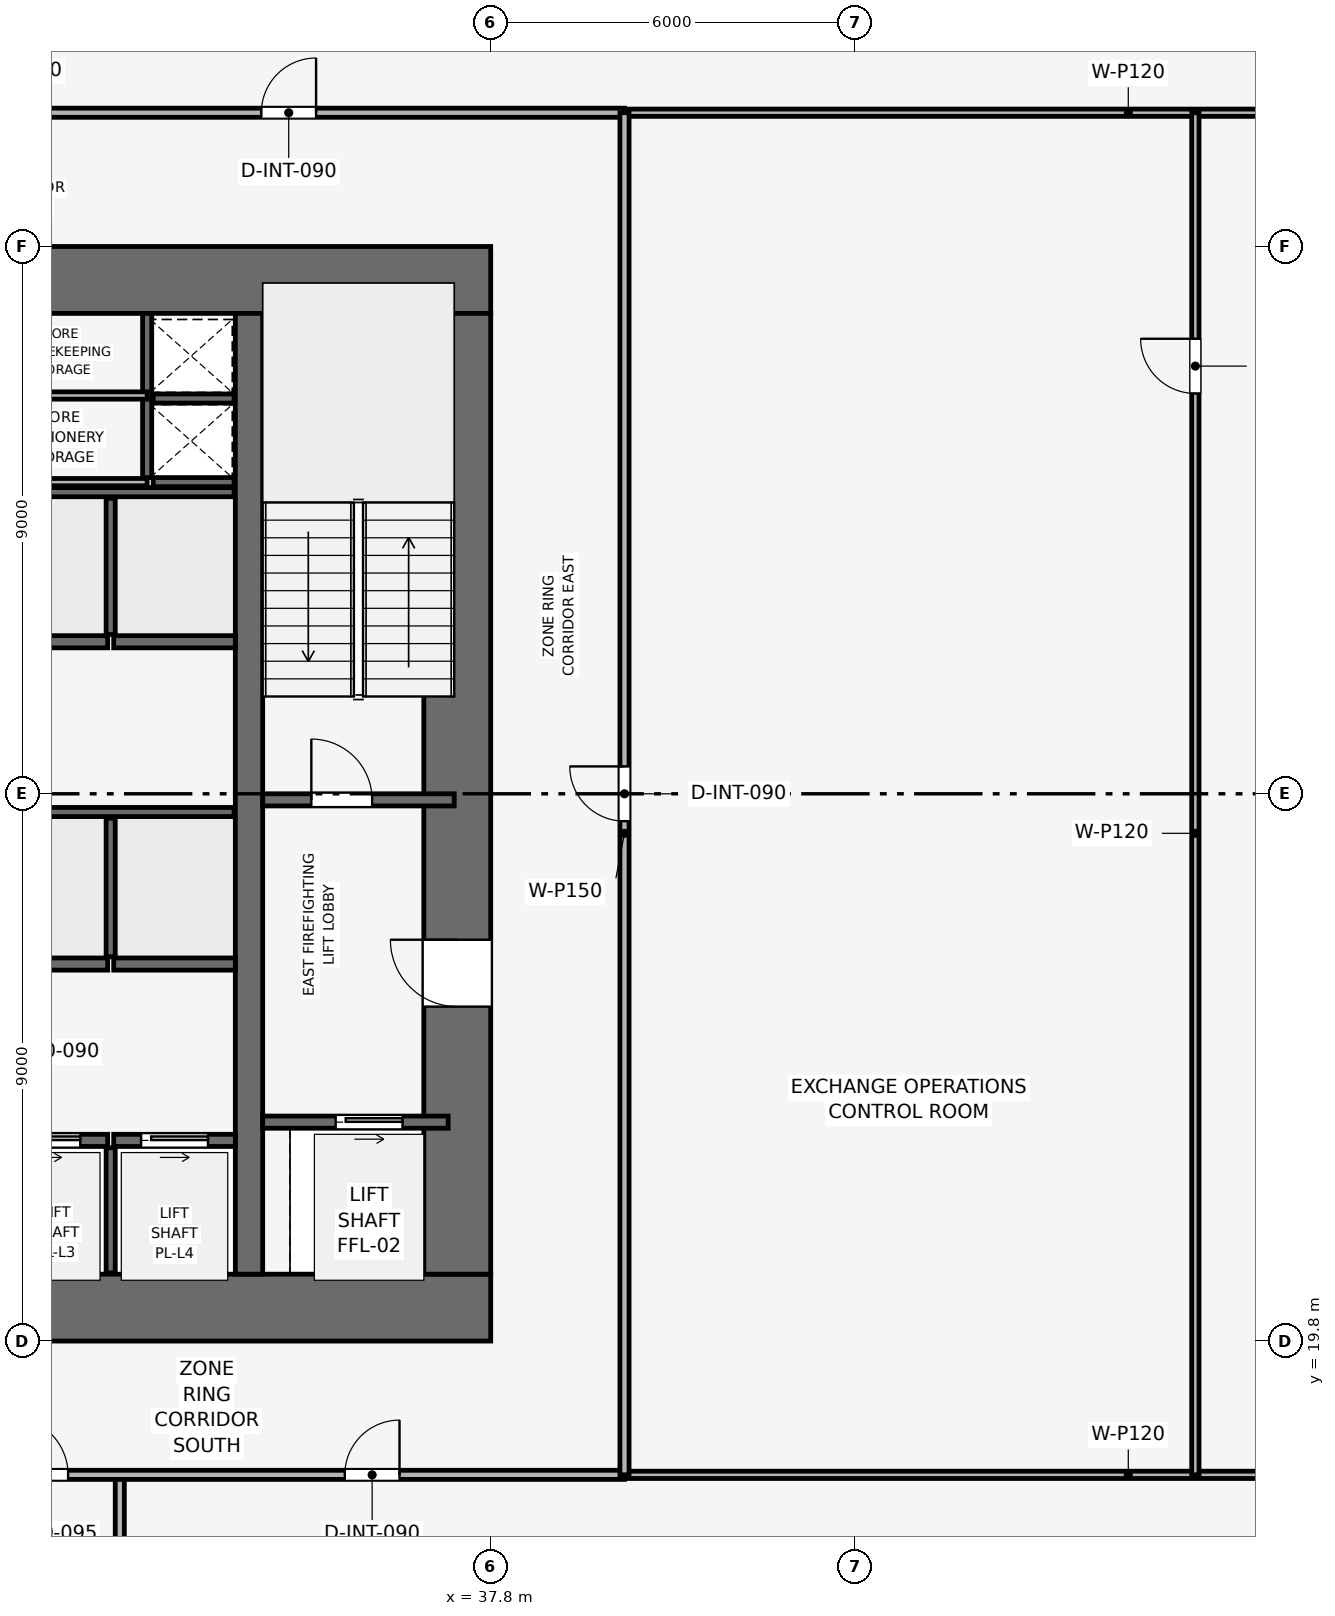
"""IFC4 building model, lengths in metres.
Left out: names, types, materials, properties, quantities, classifications, styles, units other than length and angle.
Written with IfcOpenShell. Run it as: python <this file> out.ifc"""

import sys

from ifc_helpers import new_model, si_unit, direction, frame, frame_2d, origin, place, context, subcontext, project, spatial, rectangle, extrude, element, fill, save


model = new_model("IFC4")
c1 = context("Model", 3, precision=1e-05, world=origin(), true_north=direction((0.0, 1.0)))
c2 = subcontext(c1, "Body", "Model", "MODEL_VIEW")
j1 = project(units=[si_unit("LENGTHUNIT", "METRE"), si_unit("PLANEANGLEUNIT", "RADIAN")], contexts=[c1])
p1 = place(None, origin())
s1 = spatial("IfcSite", under=j1, at=p1, CompositionType="ELEMENT")
p2 = place(p1, origin())
s2 = spatial("IfcBuilding", under=s1, at=p2, CompositionType="ELEMENT")
p3 = place(p2, frame((0.0, 0.0, 80.7)))
s3 = spatial("IfcBuildingStorey", under=s2, at=p3, CompositionType="ELEMENT", Elevation=80.7)
p4 = place(p3, frame((19.8, 20.35, 0.0), z_axis=(0.0, 0.0, 1.0), x_axis=(1.0, 0.0, 0.0)))
e1 = element("IfcWall", 1, at=p4, inside=s3, PredefinedType="SHEAR", context=c2, shape_type="SweptSolid", body=[
    extrude(rectangle(XDim=18.0, YDim=1.1, at=frame_2d((9.0, 0.0))), origin(), (0.0, 0.0, 1.0), 3.9),
])
p5 = place(p4, frame((8.4, 0.0, 0.0)))
e2 = element("IfcOpeningElement", 2, at=p5, cuts=e1, PredefinedType="OPENING", context=c2, shape_type="SweptSolid", body=[
    extrude(rectangle(XDim=1.2, YDim=2.2, at=frame_2d((0.6, 1.1))), frame((0.0, 0.56, 0.0), z_axis=(0.0, -1.0, 0.0), x_axis=(1.0, 0.0, 0.0)), (0.0, 0.0, 1.0), 1.12),
])
p6 = place(p3, frame((19.8, 37.25, 0.0), z_axis=(0.0, 0.0, 1.0), x_axis=(1.0, 0.0, 0.0)))
e3 = element("IfcWall", 3, at=p6, inside=s3, PredefinedType="SHEAR", context=c2, shape_type="SweptSolid", body=[
    extrude(rectangle(XDim=18.0, YDim=1.1, at=frame_2d((9.0, 0.0))), origin(), (0.0, 0.0, 1.0), 3.9),
])
p7 = place(p6, frame((7.05, 0.0, 0.0)))
e4 = element("IfcOpeningElement", 4, at=p7, cuts=e3, PredefinedType="OPENING", context=c2, shape_type="SweptSolid", body=[
    extrude(rectangle(XDim=1.1, YDim=2.15, at=frame_2d((0.55, 1.075))), frame((0.0, 0.56, 0.0), z_axis=(0.0, -1.0, 0.0), x_axis=(1.0, 0.0, 0.0)), (0.0, 0.0, 1.0), 1.12),
])
p8 = place(p3, frame((37.25, 20.9, 0.0), z_axis=(0.0, 0.0, 1.0), x_axis=(0.0, 1.0, 0.0)))
e5 = element("IfcWall", 5, at=p8, inside=s3, PredefinedType="SHEAR", context=c2, shape_type="SweptSolid", body=[
    extrude(rectangle(XDim=15.8, YDim=1.1, at=frame_2d((7.9, 0.0))), origin(), (0.0, 0.0, 1.0), 3.9),
])
p9 = place(p8, frame((4.4, 0.0, 0.0)))
e6 = element("IfcOpeningElement", 6, at=p9, cuts=e5, PredefinedType="OPENING", context=c2, shape_type="SweptSolid", body=[
    extrude(rectangle(XDim=1.1, YDim=2.15, at=frame_2d((0.55, 1.075))), frame((0.0, 0.56, 0.0), z_axis=(0.0, -1.0, 0.0), x_axis=(1.0, 0.0, 0.0)), (0.0, 0.0, 1.0), 1.12),
])
p10 = place(p3, frame((33.825, 20.9, 0.0), z_axis=(0.0, 0.0, 1.0), x_axis=(0.0, 1.0, 0.0)))
e7 = element("IfcWall", 7, at=p10, inside=s3, PredefinedType="SHEAR", context=c2, shape_type="SweptSolid", body=[
    extrude(rectangle(XDim=15.8, YDim=0.45, at=frame_2d((7.9, 0.0))), origin(), (0.0, 0.0, 1.0), 3.9),
])
p11 = place(p3, frame((34.05, 28.7, 0.0), z_axis=(0.0, 0.0, 1.0), x_axis=(1.0, 0.0, 0.0)))
e8 = element("IfcWall", 8, at=p11, inside=s3, PredefinedType="SHEAR", context=c2, shape_type="SweptSolid", body=[
    extrude(rectangle(XDim=3.15, YDim=0.2, at=frame_2d((1.575, 0.0))), origin(), (0.0, 0.0, 1.0), 3.65),
])
p12 = place(p11, frame((0.8, 0.0, 0.0)))
e9 = element("IfcOpeningElement", 9, at=p12, cuts=e8, PredefinedType="OPENING", context=c2, shape_type="SweptSolid", body=[
    extrude(rectangle(XDim=1.0, YDim=2.1, at=frame_2d((0.5, 1.05))), frame((0.0, 0.11, 0.0), z_axis=(0.0, -1.0, 0.0), x_axis=(1.0, 0.0, 0.0)), (0.0, 0.0, 1.0), 0.22),
])
p13 = place(p3, frame((32.15, 34.0, 0.0), z_axis=(0.0, 0.0, 1.0), x_axis=(0.0, 1.0, 0.0)))
e10 = element("IfcWall", 10, at=p13, inside=s3, PredefinedType="SHEAR", context=c2, shape_type="SweptSolid", body=[
    extrude(rectangle(XDim=2.7, YDim=0.15, at=frame_2d((1.35, 0.0))), origin(), (0.0, 0.0, 1.0), 3.65),
])
for number, where, z_axis, x_axis in (
    (11, (32.25, 33.925, 0.0), (0.0, 0.0, 1.0), (1.0, 0.0, 0.0)),
    (12, (32.25, 35.3, 0.0), (0.0, 0.0, 1.0), (1.0, 0.0, 0.0)),
):
    element("IfcWall", number, at=place(p3, frame(where, z_axis=z_axis, x_axis=x_axis)), inside=s3, PredefinedType="SHEAR", context=c2, shape_type="SweptSolid", body=[
        extrude(rectangle(XDim=1.33, YDim=0.15, at=frame_2d((0.665, 0.0))), origin(), (0.0, 0.0, 1.0), 3.65),
    ])
p14 = place(p3, frame((34.05, 23.4, 0.0), z_axis=(0.0, 0.0, 1.0), x_axis=(1.0, 0.0, 0.0)))
e13 = element("IfcWall", 13, at=p14, inside=s3, PredefinedType="SHEAR", context=c2, shape_type="SweptSolid", body=[
    extrude(rectangle(XDim=3.05, YDim=0.2, at=frame_2d((1.525, 0.0))), origin(), (0.0, 0.0, 1.0), 3.65),
])
p15 = place(p14, frame((1.2, 0.0, 0.0)))
e14 = element("IfcOpeningElement", 14, at=p15, cuts=e13, PredefinedType="OPENING", context=c2, shape_type="SweptSolid", body=[
    extrude(rectangle(XDim=1.1, YDim=2.15, at=frame_2d((0.55, 1.075))), frame((0.0, 0.11, 0.0), z_axis=(0.0, -1.0, 0.0), x_axis=(1.0, 0.0, 0.0)), (0.0, 0.0, 1.0), 0.22),
])
p16 = place(p3, frame((29.5, 23.1, 0.0), z_axis=(0.0, 0.0, 1.0), x_axis=(1.0, 0.0, 0.0)))
e15 = element("IfcWall", 15, at=p16, inside=s3, PredefinedType="SHEAR", context=c2, shape_type="SweptSolid", body=[
    extrude(rectangle(XDim=2.0, YDim=0.2, at=frame_2d((1.0, 0.0))), origin(), (0.0, 0.0, 1.0), 3.65),
])
p17 = place(p16, frame((0.45, 0.0, 0.0)))
e16 = element("IfcOpeningElement", 16, at=p17, cuts=e15, PredefinedType="OPENING", context=c2, shape_type="SweptSolid", body=[
    extrude(rectangle(XDim=1.1, YDim=2.15, at=frame_2d((0.55, 1.075))), frame((0.0, 0.11, 0.0), z_axis=(0.0, -1.0, 0.0), x_axis=(1.0, 0.0, 0.0)), (0.0, 0.0, 1.0), 0.22),
])
p18 = place(p3, frame((31.6, 23.1, 0.0), z_axis=(0.0, 0.0, 1.0), x_axis=(1.0, 0.0, 0.0)))
e17 = element("IfcWall", 17, at=p18, inside=s3, PredefinedType="SHEAR", context=c2, shape_type="SweptSolid", body=[
    extrude(rectangle(XDim=2.0, YDim=0.2, at=frame_2d((1.0, 0.0))), origin(), (0.0, 0.0, 1.0), 3.65),
])
p19 = place(p18, frame((0.45, 0.0, 0.0)))
e18 = element("IfcOpeningElement", 18, at=p19, cuts=e17, PredefinedType="OPENING", context=c2, shape_type="SweptSolid", body=[
    extrude(rectangle(XDim=1.1, YDim=2.15, at=frame_2d((0.55, 1.075))), frame((0.0, 0.11, 0.0), z_axis=(0.0, -1.0, 0.0), x_axis=(1.0, 0.0, 0.0)), (0.0, 0.0, 1.0), 0.22),
])
for number, where, z_axis, x_axis in (
    (19, (29.5, 26.0, 0.0), (0.0, 0.0, 1.0), (1.0, 0.0, 0.0)),
    (20, (31.6, 26.0, 0.0), (0.0, 0.0, 1.0), (1.0, 0.0, 0.0)),
    (21, (29.5, 31.3, 0.0), (0.0, 0.0, 1.0), (1.0, 0.0, 0.0)),
    (22, (31.6, 31.3, 0.0), (0.0, 0.0, 1.0), (1.0, 0.0, 0.0)),
):
    element("IfcWall", number, at=place(p3, frame(where, z_axis=z_axis, x_axis=x_axis)), inside=s3, PredefinedType="SHEAR", context=c2, shape_type="SweptSolid", body=[
        extrude(rectangle(XDim=2.0, YDim=0.2, at=frame_2d((1.0, 0.0))), origin(), (0.0, 0.0, 1.0), 3.65),
    ])
p20 = place(p3, frame((31.55, 20.92, 0.0), z_axis=(0.0, 0.0, 1.0), x_axis=(0.0, 1.0, 0.0)))
e23 = element("IfcWall", 23, at=p20, inside=s3, PredefinedType="SHEAR", context=c2, shape_type="SweptSolid", body=[
    extrude(rectangle(XDim=2.06, YDim=0.15, at=frame_2d((1.03, 0.0))), origin(), (0.0, 0.0, 1.0), 3.65),
])
p21 = place(p3, frame((29.5, 28.5, 0.0), z_axis=(0.0, 0.0, 1.0), x_axis=(1.0, 0.0, 0.0)))
e24 = element("IfcWall", 24, at=p21, inside=s3, PredefinedType="SHEAR", context=c2, shape_type="SweptSolid", body=[
    extrude(rectangle(XDim=4.08, YDim=0.15, at=frame_2d((2.04, 0.0))), origin(), (0.0, 0.0, 1.0), 3.65),
])
p22 = place(p3, frame((31.55, 26.12, 0.0), z_axis=(0.0, 0.0, 1.0), x_axis=(0.0, 1.0, 0.0)))
e25 = element("IfcWall", 25, at=p22, inside=s3, PredefinedType="SHEAR", context=c2, shape_type="SweptSolid", body=[
    extrude(rectangle(XDim=2.28, YDim=0.15, at=frame_2d((1.14, 0.0))), origin(), (0.0, 0.0, 1.0), 3.65),
])
p23 = place(p3, frame((29.5, 33.76, 0.0), z_axis=(0.0, 0.0, 1.0), x_axis=(1.0, 0.0, 0.0)))
e26 = element("IfcWall", 26, at=p23, inside=s3, PredefinedType="SHEAR", context=c2, shape_type="SweptSolid", body=[
    extrude(rectangle(XDim=4.08, YDim=0.15, at=frame_2d((2.04, 0.0))), origin(), (0.0, 0.0, 1.0), 3.65),
])
p24 = place(p3, frame((31.55, 31.42, 0.0), z_axis=(0.0, 0.0, 1.0), x_axis=(0.0, 1.0, 0.0)))
e27 = element("IfcWall", 27, at=p24, inside=s3, PredefinedType="SHEAR", context=c2, shape_type="SweptSolid", body=[
    extrude(rectangle(XDim=2.24, YDim=0.15, at=frame_2d((1.12, 0.0))), origin(), (0.0, 0.0, 1.0), 3.65),
])
for number, where, z_axis, x_axis in (
    (28, (28.85, 35.35, 0.0), (0.0, 0.0, 1.0), (1.0, 0.0, 0.0)),
    (29, (28.85, 33.925, 0.0), (0.0, 0.0, 1.0), (1.0, 0.0, 0.0)),
):
    element("IfcWall", number, at=place(p3, frame(where, z_axis=z_axis, x_axis=x_axis)), inside=s3, PredefinedType="PARTITIONING", context=c2, shape_type="SweptSolid", body=[
        extrude(rectangle(XDim=3.3, YDim=0.12, at=frame_2d((1.65, 0.0))), origin(), (0.0, 0.0, 1.0), 3.65),
    ])
p25 = place(p3, frame((31.7, 1.03, 0.0), z_axis=(0.0, 0.0, 1.0), x_axis=(0.0, 1.0, 0.0)))
e30 = element("IfcWall", 30, at=p25, inside=s3, PredefinedType="PARTITIONING", context=c2, shape_type="SweptSolid", body=[
    extrude(rectangle(XDim=16.57, YDim=0.15, at=frame_2d((8.285, 0.0))), origin(), (0.0, 0.0, 1.0), 2.935),
])
for number, where, z_axis, x_axis in (
    (31, (40.0, 17.6, 0.0), (0.0, 0.0, 1.0), (1.0, 0.0, 0.0)),
    (32, (40.0, 40.0, 0.0), (0.0, 0.0, 1.0), (1.0, 0.0, 0.0)),
):
    element("IfcWall", number, at=place(p3, frame(where, z_axis=z_axis, x_axis=x_axis)), inside=s3, PredefinedType="PARTITIONING", context=c2, shape_type="SweptSolid", body=[
        extrude(rectangle(XDim=16.57, YDim=0.12, at=frame_2d((8.285, 0.0))), origin(), (0.0, 0.0, 1.0), 2.935),
    ])
p26 = place(p3, frame((49.388, 17.6, 0.0), z_axis=(0.0, 0.0, 1.0), x_axis=(0.0, 1.0, 0.0)))
e33 = element("IfcWall", 33, at=p26, inside=s3, PredefinedType="PARTITIONING", context=c2, shape_type="SweptSolid", body=[
    extrude(rectangle(XDim=22.4, YDim=0.12, at=frame_2d((11.2, 0.0))), origin(), (0.0, 0.0, 1.0), 3.085),
])
p27 = place(p26, frame((17.783, 0.0, 0.0)))
e34 = element("IfcOpeningElement", 34, at=p27, cuts=e33, PredefinedType="OPENING", context=c2, shape_type="SweptSolid", body=[
    extrude(rectangle(XDim=0.9, YDim=2.1, at=frame_2d((0.45, 1.05))), frame((0.0, 0.07, 0.0), z_axis=(0.0, -1.0, 0.0), x_axis=(1.0, 0.0, 0.0)), (0.0, 0.0, 1.0), 0.14),
])
p28 = place(p3, frame((17.6, 17.6, 0.0), z_axis=(0.0, 0.0, 1.0), x_axis=(1.0, 0.0, 0.0)))
e35 = element("IfcWall", 35, at=p28, inside=s3, PredefinedType="PARTITIONING", context=c2, shape_type="SweptSolid", body=[
    extrude(rectangle(XDim=22.4, YDim=0.15, at=frame_2d((11.2, 0.0))), origin(), (0.0, 0.0, 1.0), 3.085),
])
p29 = place(p28, frame((2.4, 0.0, 0.0)))
e36 = element("IfcOpeningElement", 36, at=p29, cuts=e35, PredefinedType="OPENING", context=c2, shape_type="SweptSolid", body=[
    extrude(rectangle(XDim=0.9, YDim=2.1, at=frame_2d((0.45, 1.05))), frame((0.0, 0.085, 0.0), z_axis=(0.0, -1.0, 0.0), x_axis=(1.0, 0.0, 0.0)), (0.0, 0.0, 1.0), 0.17),
])
p30 = place(p28, frame((6.65, 0.0, 0.0)))
e37 = element("IfcOpeningElement", 37, at=p30, cuts=e35, PredefinedType="OPENING", context=c2, shape_type="SweptSolid", body=[
    extrude(rectangle(XDim=0.9, YDim=2.1, at=frame_2d((0.45, 1.05))), frame((0.0, 0.085, 0.0), z_axis=(0.0, -1.0, 0.0), x_axis=(1.0, 0.0, 0.0)), (0.0, 0.0, 1.0), 0.17),
])
p31 = place(p28, frame((9.55, 0.0, 0.0)))
e38 = element("IfcOpeningElement", 38, at=p31, cuts=e35, PredefinedType="OPENING", context=c2, shape_type="SweptSolid", body=[
    extrude(rectangle(XDim=0.9, YDim=2.1, at=frame_2d((0.45, 1.05))), frame((0.0, 0.085, 0.0), z_axis=(0.0, -1.0, 0.0), x_axis=(1.0, 0.0, 0.0)), (0.0, 0.0, 1.0), 0.17),
])
p32 = place(p28, frame((12.3, 0.0, 0.0)))
e39 = element("IfcOpeningElement", 39, at=p32, cuts=e35, PredefinedType="OPENING", context=c2, shape_type="SweptSolid", body=[
    extrude(rectangle(XDim=0.95, YDim=2.1, at=frame_2d((0.475, 1.05))), frame((0.0, 0.085, 0.0), z_axis=(0.0, -1.0, 0.0), x_axis=(1.0, 0.0, 0.0)), (0.0, 0.0, 1.0), 0.17),
])
p33 = place(p28, frame((17.8, 0.0, 0.0)))
e40 = element("IfcOpeningElement", 40, at=p33, cuts=e35, PredefinedType="OPENING", context=c2, shape_type="SweptSolid", body=[
    extrude(rectangle(XDim=0.9, YDim=2.1, at=frame_2d((0.45, 1.05))), frame((0.0, 0.085, 0.0), z_axis=(0.0, -1.0, 0.0), x_axis=(1.0, 0.0, 0.0)), (0.0, 0.0, 1.0), 0.17),
])
p34 = place(p3, frame((17.6, 40.0, 0.0), z_axis=(0.0, 0.0, 1.0), x_axis=(1.0, 0.0, 0.0)))
e41 = element("IfcWall", 41, at=p34, inside=s3, PredefinedType="PARTITIONING", context=c2, shape_type="SweptSolid", body=[
    extrude(rectangle(XDim=22.4, YDim=0.15, at=frame_2d((11.2, 0.0))), origin(), (0.0, 0.0, 1.0), 3.085),
])
p35 = place(p34, frame((0.7, 0.0, 0.0)))
e42 = element("IfcOpeningElement", 42, at=p35, cuts=e41, PredefinedType="OPENING", context=c2, shape_type="SweptSolid", body=[
    extrude(rectangle(XDim=0.9, YDim=2.1, at=frame_2d((0.45, 1.05))), frame((0.0, 0.085, 0.0), z_axis=(0.0, -1.0, 0.0), x_axis=(1.0, 0.0, 0.0)), (0.0, 0.0, 1.0), 0.17),
])
p36 = place(p34, frame((6.378, 0.0, 0.0)))
e43 = element("IfcOpeningElement", 43, at=p36, cuts=e41, PredefinedType="OPENING", context=c2, shape_type="SweptSolid", body=[
    extrude(rectangle(XDim=0.9, YDim=2.1, at=frame_2d((0.45, 1.05))), frame((0.0, 0.085, 0.0), z_axis=(0.0, -1.0, 0.0), x_axis=(1.0, 0.0, 0.0)), (0.0, 0.0, 1.0), 0.17),
])
p37 = place(p34, frame((16.428, 0.0, 0.0)))
e44 = element("IfcOpeningElement", 44, at=p37, cuts=e41, PredefinedType="OPENING", context=c2, shape_type="SweptSolid", body=[
    extrude(rectangle(XDim=0.9, YDim=2.1, at=frame_2d((0.45, 1.05))), frame((0.0, 0.085, 0.0), z_axis=(0.0, -1.0, 0.0), x_axis=(1.0, 0.0, 0.0)), (0.0, 0.0, 1.0), 0.17),
])
p38 = place(p3, frame((40.0, 17.6, 0.0), z_axis=(0.0, 0.0, 1.0), x_axis=(0.0, 1.0, 0.0)))
e45 = element("IfcWall", 45, at=p38, inside=s3, PredefinedType="PARTITIONING", context=c2, shape_type="SweptSolid", body=[
    extrude(rectangle(XDim=22.4, YDim=0.15, at=frame_2d((11.2, 0.0))), origin(), (0.0, 0.0, 1.0), 3.085),
])
p39 = place(p38, frame((10.75, 0.0, 0.0)))
e46 = element("IfcOpeningElement", 46, at=p39, cuts=e45, PredefinedType="OPENING", context=c2, shape_type="SweptSolid", body=[
    extrude(rectangle(XDim=0.9, YDim=2.1, at=frame_2d((0.45, 1.05))), frame((0.0, 0.085, 0.0), z_axis=(0.0, -1.0, 0.0), x_axis=(1.0, 0.0, 0.0)), (0.0, 0.0, 1.0), 0.17),
])
p40 = place(p12, origin())
e47 = element("IfcDoor", 47, at=p40, inside=s3, OperationType="SINGLE_SWING_LEFT", PredefinedType="DOOR", context=c2, shape_type="SweptSolid", body=[
    extrude(rectangle(XDim=1.0, YDim=2.1, at=frame_2d((0.5, 1.05))), frame((0.0, 0.025, 0.0), z_axis=(0.0, -1.0, 0.0), x_axis=(1.0, 0.0, 0.0)), (0.0, 0.0, 1.0), 0.05),
])
fill(e9, e47)
p41 = place(p15, origin())
e48 = element("IfcDoor", 48, at=p41, inside=s3, OperationType="SLIDING_TO_RIGHT", PredefinedType="DOOR", context=c2, shape_type="SweptSolid", body=[
    extrude(rectangle(XDim=1.1, YDim=2.15, at=frame_2d((0.55, 1.075))), frame((0.0, 0.025, 0.0), z_axis=(0.0, -1.0, 0.0), x_axis=(1.0, 0.0, 0.0)), (0.0, 0.0, 1.0), 0.05),
])
fill(e14, e48)
p42 = place(p17, origin())
e49 = element("IfcDoor", 49, at=p42, inside=s3, OperationType="SLIDING_TO_RIGHT", PredefinedType="DOOR", context=c2, shape_type="SweptSolid", body=[
    extrude(rectangle(XDim=1.1, YDim=2.15, at=frame_2d((0.55, 1.075))), frame((0.0, 0.025, 0.0), z_axis=(0.0, -1.0, 0.0), x_axis=(1.0, 0.0, 0.0)), (0.0, 0.0, 1.0), 0.05),
])
fill(e16, e49)
p43 = place(p19, origin())
e50 = element("IfcDoor", 50, at=p43, inside=s3, OperationType="SLIDING_TO_RIGHT", PredefinedType="DOOR", context=c2, shape_type="SweptSolid", body=[
    extrude(rectangle(XDim=1.1, YDim=2.15, at=frame_2d((0.55, 1.075))), frame((0.0, 0.025, 0.0), z_axis=(0.0, -1.0, 0.0), x_axis=(1.0, 0.0, 0.0)), (0.0, 0.0, 1.0), 0.05),
])
fill(e18, e50)
p44 = place(p27, origin())
e51 = element("IfcDoor", 51, at=p44, inside=s3, OperationType="SINGLE_SWING_RIGHT", PredefinedType="DOOR", context=c2, shape_type="SweptSolid", body=[
    extrude(rectangle(XDim=0.9, YDim=2.1, at=frame_2d((0.45, 1.05))), frame((0.0, 0.025, 0.0), z_axis=(0.0, -1.0, 0.0), x_axis=(1.0, 0.0, 0.0)), (0.0, 0.0, 1.0), 0.05),
])
fill(e34, e51)
p45 = place(p32, origin())
e52 = element("IfcDoor", 52, at=p45, inside=s3, OperationType="SINGLE_SWING_LEFT", PredefinedType="DOOR", context=c2, shape_type="SweptSolid", body=[
    extrude(rectangle(XDim=0.95, YDim=2.1, at=frame_2d((0.475, 1.05))), frame((0.0, 0.025, 0.0), z_axis=(0.0, -1.0, 0.0), x_axis=(1.0, 0.0, 0.0)), (0.0, 0.0, 1.0), 0.05),
])
fill(e39, e52)
p46 = place(p33, origin())
e53 = element("IfcDoor", 53, at=p46, inside=s3, OperationType="SINGLE_SWING_RIGHT", PredefinedType="DOOR", context=c2, shape_type="SweptSolid", body=[
    extrude(rectangle(XDim=0.9, YDim=2.1, at=frame_2d((0.45, 1.05))), frame((0.0, 0.025, 0.0), z_axis=(0.0, -1.0, 0.0), x_axis=(1.0, 0.0, 0.0)), (0.0, 0.0, 1.0), 0.05),
])
fill(e40, e53)
p47 = place(p37, origin())
e54 = element("IfcDoor", 54, at=p47, inside=s3, OperationType="SINGLE_SWING_RIGHT", PredefinedType="DOOR", context=c2, shape_type="SweptSolid", body=[
    extrude(rectangle(XDim=0.9, YDim=2.1, at=frame_2d((0.45, 1.05))), frame((0.0, 0.025, 0.0), z_axis=(0.0, -1.0, 0.0), x_axis=(1.0, 0.0, 0.0)), (0.0, 0.0, 1.0), 0.05),
])
fill(e44, e54)
p48 = place(p39, origin())
e55 = element("IfcDoor", 55, at=p48, inside=s3, OperationType="SINGLE_SWING_RIGHT", PredefinedType="DOOR", context=c2, shape_type="SweptSolid", body=[
    extrude(rectangle(XDim=0.9, YDim=2.1, at=frame_2d((0.45, 1.05))), frame((0.0, 0.025, 0.0), z_axis=(0.0, -1.0, 0.0), x_axis=(1.0, 0.0, 0.0)), (0.0, 0.0, 1.0), 0.05),
])
fill(e46, e55)
p49 = place(p9, origin())
e56 = element("IfcDoor", 56, at=p49, inside=s3, OperationType="SINGLE_SWING_RIGHT", PredefinedType="DOOR", context=c2, shape_type="SweptSolid", body=[
    extrude(rectangle(XDim=1.1, YDim=2.15, at=frame_2d((0.55, 1.075))), frame((0.0, 0.025, 0.0), z_axis=(0.0, -1.0, 0.0), x_axis=(1.0, 0.0, 0.0)), (0.0, 0.0, 1.0), 0.05),
])
fill(e6, e56)
save(model, sys.argv[1])
